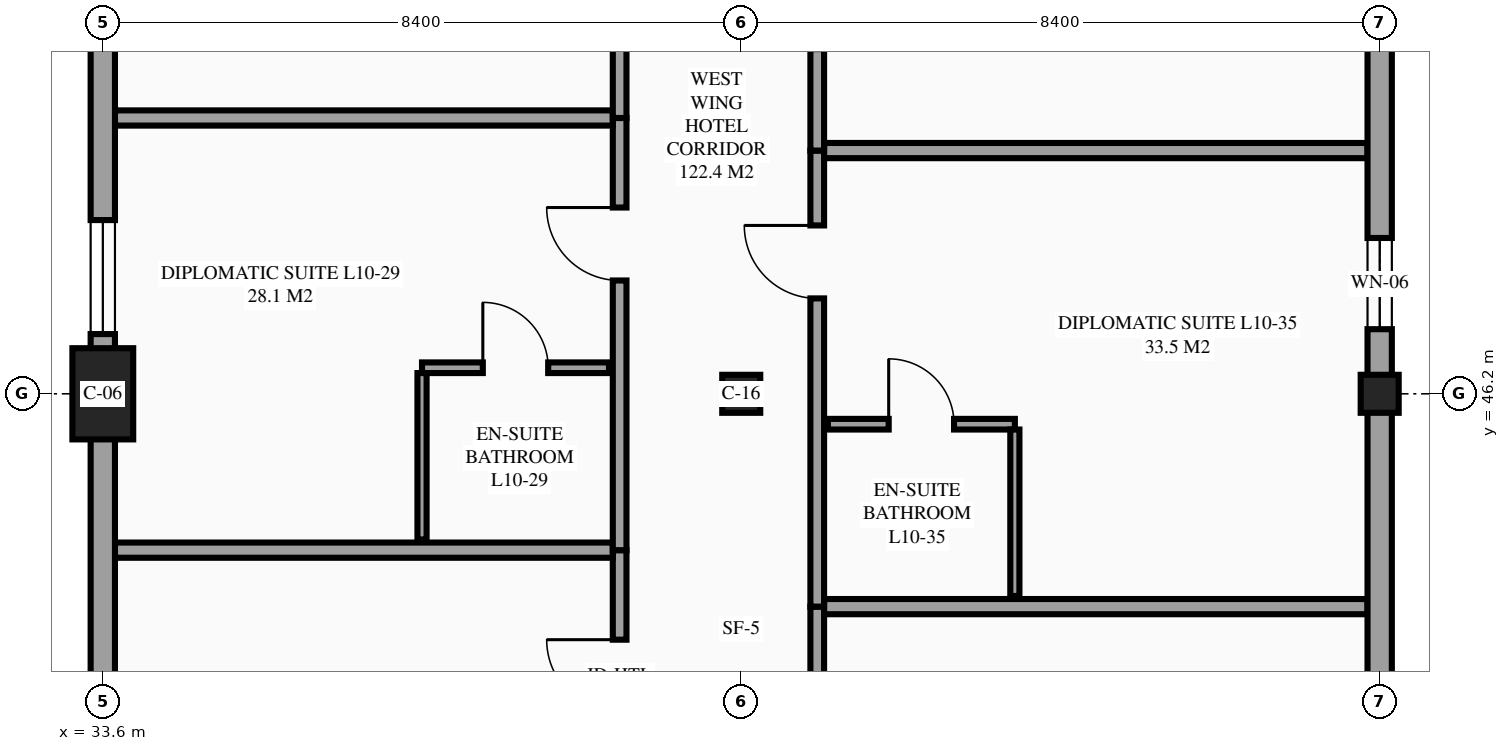
"""IFC4 building model, lengths in metres.
Left out: names, types, materials, properties, quantities, classifications, styles, units other than length and angle.
Written with IfcOpenShell. Run it as: python <this file> out.ifc"""

import sys

from ifc_helpers import new_model, si_unit, direction, frame, frame_2d, origin, origin_2d, place, context, subcontext, project, spatial, rectangle, extrude, element, fill, save


model = new_model("IFC4")
c1 = context("Model", 3, precision=1e-05, world=origin(), true_north=direction((0.0, 1.0)))
c2 = subcontext(c1, "Body", "Model", "MODEL_VIEW")
j1 = project(units=[si_unit("LENGTHUNIT", "METRE"), si_unit("PLANEANGLEUNIT", "RADIAN")], contexts=[c1])
p1 = place(None, origin())
s1 = spatial("IfcSite", under=j1, at=p1, CompositionType="ELEMENT")
p2 = place(p1, origin())
s2 = spatial("IfcBuilding", under=s1, at=p2, CompositionType="ELEMENT")
p3 = place(p2, frame((0.0, 0.0, 39.9)))
s3 = spatial("IfcBuildingStorey", under=s2, at=p3, CompositionType="ELEMENT", Elevation=39.9)
p4 = place(p3, frame((33.6, 46.2, 0.0), z_axis=(0.0, 0.0, 1.0), x_axis=(1.0, 0.0, 0.0)))
e1 = element("IfcColumn", 1, at=p4, inside=s3, PredefinedType="COLUMN", context=c2, shape_type="SweptSolid", body=[
    extrude(rectangle(XDim=0.8, YDim=1.2, at=origin_2d()), origin(), (0.0, 0.0, 1.0), 3.6),
])
for number, where, z_axis, x_axis in (
    (2, (42.0, 46.2, 0.0), (0.0, 0.0, 1.0), (1.0, 0.0, 0.0)),
    (3, (50.4, 46.2, 0.0), (0.0, 0.0, 1.0), (1.0, 0.0, 0.0)),
):
    element("IfcColumn", number, at=place(p3, frame(where, z_axis=z_axis, x_axis=x_axis)), inside=s3, PredefinedType="COLUMN", context=c2, shape_type="SweptSolid", body=[
        extrude(rectangle(XDim=0.5, YDim=0.5, at=origin_2d()), origin(), (0.0, 0.0, 1.0), 3.6),
    ])
p5 = place(p3, frame((40.4, 38.457, 0.0), z_axis=(0.0, 0.0, 1.0), x_axis=(0.0, 1.0, 0.0)))
e4 = element("IfcWall", 4, at=p5, inside=s3, PredefinedType="PARTITIONING", context=c2, shape_type="SweptSolid", body=[
    extrude(rectangle(XDim=5.686, YDim=0.18, at=frame_2d((2.843, 0.0))), origin(), (0.0, 0.0, 1.0), 3.375),
])
p6 = place(p5, frame((3.548, 0.0, 0.0)))
e5 = element("IfcOpeningElement", 5, at=p6, cuts=e4, PredefinedType="OPENING", context=c2, shape_type="SweptSolid", body=[
    extrude(rectangle(XDim=0.96, YDim=2.15, at=frame_2d((0.48, 1.075))), frame((0.0, 0.1, 0.0), z_axis=(0.0, -1.0, 0.0), x_axis=(1.0, 0.0, 0.0)), (0.0, 0.0, 1.0), 0.2),
])
p7 = place(p3, frame((33.76, 44.143, 0.0), z_axis=(0.0, 0.0, 1.0), x_axis=(1.0, 0.0, 0.0)))
e6 = element("IfcWall", 6, at=p7, inside=s3, PredefinedType="PARTITIONING", context=c2, shape_type="SweptSolid", body=[
    extrude(rectangle(XDim=6.55, YDim=0.2, at=frame_2d((3.275, 0.0))), origin(), (0.0, 0.0, 1.0), 3.375),
])
p8 = place(p3, frame((40.4, 44.143, 0.0), z_axis=(0.0, 0.0, 1.0), x_axis=(0.0, 1.0, 0.0)))
e7 = element("IfcWall", 7, at=p8, inside=s3, PredefinedType="PARTITIONING", context=c2, shape_type="SweptSolid", body=[
    extrude(rectangle(XDim=5.686, YDim=0.18, at=frame_2d((2.843, 0.0))), origin(), (0.0, 0.0, 1.0), 3.375),
])
p9 = place(p8, frame((3.548, 0.0, 0.0)))
e8 = element("IfcOpeningElement", 8, at=p9, cuts=e7, PredefinedType="OPENING", context=c2, shape_type="SweptSolid", body=[
    extrude(rectangle(XDim=0.96, YDim=2.15, at=frame_2d((0.48, 1.075))), frame((0.0, 0.1, 0.0), z_axis=(0.0, -1.0, 0.0), x_axis=(1.0, 0.0, 0.0)), (0.0, 0.0, 1.0), 0.2),
])
p10 = place(p3, frame((33.76, 49.829, 0.0), z_axis=(0.0, 0.0, 1.0), x_axis=(1.0, 0.0, 0.0)))
e9 = element("IfcWall", 9, at=p10, inside=s3, PredefinedType="PARTITIONING", context=c2, shape_type="SweptSolid", body=[
    extrude(rectangle(XDim=6.55, YDim=0.2, at=frame_2d((3.275, 0.0))), origin(), (0.0, 0.0, 1.0), 3.375),
])
p11 = place(p3, frame((37.8, 46.543, 0.0), z_axis=(0.0, 0.0, 1.0), x_axis=(1.0, 0.0, 0.0)))
e10 = element("IfcWall", 10, at=p11, inside=s3, PredefinedType="PARTITIONING", context=c2, shape_type="SweptSolid", body=[
    extrude(rectangle(XDim=2.46, YDim=0.14, at=frame_2d((1.23, 0.0))), origin(), (0.0, 0.0, 1.0), 3.375),
])
p12 = place(p11, frame((0.8, 0.0, 0.0)))
e11 = element("IfcOpeningElement", 11, at=p12, cuts=e10, PredefinedType="OPENING", context=c2, shape_type="SweptSolid", body=[
    extrude(rectangle(XDim=0.86, YDim=2.1, at=frame_2d((0.43, 1.05))), frame((0.0, 0.08, 0.0), z_axis=(0.0, -1.0, 0.0), x_axis=(1.0, 0.0, 0.0)), (0.0, 0.0, 1.0), 0.16),
])
p13 = place(p3, frame((37.8, 44.283, 0.0), z_axis=(0.0, 0.0, 1.0), x_axis=(0.0, 1.0, 0.0)))
e12 = element("IfcWall", 12, at=p13, inside=s3, PredefinedType="PARTITIONING", context=c2, shape_type="SweptSolid", body=[
    extrude(rectangle(XDim=2.19, YDim=0.12, at=frame_2d((1.095, 0.0))), origin(), (0.0, 0.0, 1.0), 3.375),
])
p14 = place(p3, frame((40.4, 49.829, 0.0), z_axis=(0.0, 0.0, 1.0), x_axis=(0.0, 1.0, 0.0)))
e13 = element("IfcWall", 13, at=p14, inside=s3, PredefinedType="PARTITIONING", context=c2, shape_type="SweptSolid", body=[
    extrude(rectangle(XDim=5.686, YDim=0.18, at=frame_2d((2.843, 0.0))), origin(), (0.0, 0.0, 1.0), 3.375),
])
p15 = place(p14, frame((1.178, 0.0, 0.0)))
e14 = element("IfcOpeningElement", 14, at=p15, cuts=e13, PredefinedType="OPENING", context=c2, shape_type="SweptSolid", body=[
    extrude(rectangle(XDim=0.96, YDim=2.15, at=frame_2d((0.48, 1.075))), frame((0.0, 0.1, 0.0), z_axis=(0.0, -1.0, 0.0), x_axis=(1.0, 0.0, 0.0)), (0.0, 0.0, 1.0), 0.2),
])
p16 = place(p3, frame((43.0, 37.4, 0.0), z_axis=(0.0, 0.0, 1.0), x_axis=(0.0, 1.0, 0.0)))
e15 = element("IfcWall", 15, at=p16, inside=s3, PredefinedType="PARTITIONING", context=c2, shape_type="SweptSolid", body=[
    extrude(rectangle(XDim=6.0, YDim=0.18, at=frame_2d((3.0, 0.0))), origin(), (0.0, 0.0, 1.0), 3.375),
])
p17 = place(p16, frame((3.705, 0.0, 0.0)))
e16 = element("IfcOpeningElement", 16, at=p17, cuts=e15, PredefinedType="OPENING", context=c2, shape_type="SweptSolid", body=[
    extrude(rectangle(XDim=0.96, YDim=2.15, at=frame_2d((0.48, 1.075))), frame((0.0, 0.1, 0.0), z_axis=(0.0, -1.0, 0.0), x_axis=(1.0, 0.0, 0.0)), (0.0, 0.0, 1.0), 0.2),
])
p18 = place(p3, frame((43.09, 43.4, 0.0), z_axis=(0.0, 0.0, 1.0), x_axis=(1.0, 0.0, 0.0)))
e17 = element("IfcWall", 17, at=p18, inside=s3, PredefinedType="PARTITIONING", context=c2, shape_type="SweptSolid", body=[
    extrude(rectangle(XDim=7.15, YDim=0.2, at=frame_2d((3.575, 0.0))), origin(), (0.0, 0.0, 1.0), 3.375),
])
p19 = place(p3, frame((43.0, 43.4, 0.0), z_axis=(0.0, 0.0, 1.0), x_axis=(0.0, 1.0, 0.0)))
e18 = element("IfcWall", 18, at=p19, inside=s3, PredefinedType="PARTITIONING", context=c2, shape_type="SweptSolid", body=[
    extrude(rectangle(XDim=6.0, YDim=0.18, at=frame_2d((3.0, 0.0))), origin(), (0.0, 0.0, 1.0), 3.375),
])
p20 = place(p19, frame((4.055, 0.0, 0.0)))
e19 = element("IfcOpeningElement", 19, at=p20, cuts=e18, PredefinedType="OPENING", context=c2, shape_type="SweptSolid", body=[
    extrude(rectangle(XDim=0.96, YDim=2.15, at=frame_2d((0.48, 1.075))), frame((0.0, 0.1, 0.0), z_axis=(0.0, -1.0, 0.0), x_axis=(1.0, 0.0, 0.0)), (0.0, 0.0, 1.0), 0.2),
])
p21 = place(p3, frame((43.09, 49.4, 0.0), z_axis=(0.0, 0.0, 1.0), x_axis=(1.0, 0.0, 0.0)))
e20 = element("IfcWall", 20, at=p21, inside=s3, PredefinedType="PARTITIONING", context=c2, shape_type="SweptSolid", body=[
    extrude(rectangle(XDim=7.15, YDim=0.2, at=frame_2d((3.575, 0.0))), origin(), (0.0, 0.0, 1.0), 3.375),
])
p22 = place(p3, frame((43.14, 45.8, 0.0), z_axis=(0.0, 0.0, 1.0), x_axis=(1.0, 0.0, 0.0)))
e21 = element("IfcWall", 21, at=p22, inside=s3, PredefinedType="PARTITIONING", context=c2, shape_type="SweptSolid", body=[
    extrude(rectangle(XDim=2.46, YDim=0.14, at=frame_2d((1.23, 0.0))), origin(), (0.0, 0.0, 1.0), 3.375),
])
p23 = place(p22, frame((0.8, 0.0, 0.0)))
e22 = element("IfcOpeningElement", 22, at=p23, cuts=e21, PredefinedType="OPENING", context=c2, shape_type="SweptSolid", body=[
    extrude(rectangle(XDim=0.86, YDim=2.1, at=frame_2d((0.43, 1.05))), frame((0.0, 0.08, 0.0), z_axis=(0.0, -1.0, 0.0), x_axis=(1.0, 0.0, 0.0)), (0.0, 0.0, 1.0), 0.16),
])
p24 = place(p3, frame((45.6, 43.54, 0.0), z_axis=(0.0, 0.0, 1.0), x_axis=(0.0, 1.0, 0.0)))
e23 = element("IfcWall", 23, at=p24, inside=s3, PredefinedType="PARTITIONING", context=c2, shape_type="SweptSolid", body=[
    extrude(rectangle(XDim=2.19, YDim=0.12, at=frame_2d((1.095, 0.0))), origin(), (0.0, 0.0, 1.0), 3.375),
])
p25 = place(p3, frame((43.0, 49.4, 0.0), z_axis=(0.0, 0.0, 1.0), x_axis=(0.0, 1.0, 0.0)))
e24 = element("IfcWall", 24, at=p25, inside=s3, PredefinedType="PARTITIONING", context=c2, shape_type="SweptSolid", body=[
    extrude(rectangle(XDim=6.0, YDim=0.18, at=frame_2d((3.0, 0.0))), origin(), (0.0, 0.0, 1.0), 3.375),
])
p26 = place(p25, frame((1.335, 0.0, 0.0)))
e25 = element("IfcOpeningElement", 25, at=p26, cuts=e24, PredefinedType="OPENING", context=c2, shape_type="SweptSolid", body=[
    extrude(rectangle(XDim=0.96, YDim=2.15, at=frame_2d((0.48, 1.075))), frame((0.0, 0.1, 0.0), z_axis=(0.0, -1.0, 0.0), x_axis=(1.0, 0.0, 0.0)), (0.0, 0.0, 1.0), 0.2),
])
p27 = place(p3, frame((50.4, 37.8, 0.0), z_axis=(0.0, 0.0, 1.0), x_axis=(0.0, 1.0, 0.0)))
e26 = element("IfcWall", 26, at=p27, inside=s3, PredefinedType="STANDARD", context=c2, shape_type="SweptSolid", body=[
    extrude(rectangle(XDim=8.4, YDim=0.32, at=frame_2d((4.2, 0.0))), origin(), (0.0, 0.0, 1.0), 2.58),
])
p28 = place(p27, frame((1.85, 0.0, 0.85)))
e27 = element("IfcOpeningElement", 27, at=p28, cuts=e26, PredefinedType="OPENING", context=c2, shape_type="SweptSolid", body=[
    extrude(rectangle(XDim=1.5, YDim=1.5, at=frame_2d((0.75, 0.75))), frame((0.0, 0.17, 0.0), z_axis=(0.0, -1.0, 0.0), x_axis=(1.0, 0.0, 0.0)), (0.0, 0.0, 1.0), 0.34),
])
p29 = place(p3, frame((50.4, 46.2, 0.0), z_axis=(0.0, 0.0, 1.0), x_axis=(0.0, 1.0, 0.0)))
e28 = element("IfcWall", 28, at=p29, inside=s3, PredefinedType="STANDARD", context=c2, shape_type="SweptSolid", body=[
    extrude(rectangle(XDim=8.4, YDim=0.32, at=frame_2d((4.2, 0.0))), origin(), (0.0, 0.0, 1.0), 3.126),
])
p30 = place(p29, frame((0.85, 0.0, 0.85)))
e29 = element("IfcOpeningElement", 29, at=p30, cuts=e28, PredefinedType="OPENING", context=c2, shape_type="SweptSolid", body=[
    extrude(rectangle(XDim=1.2, YDim=1.5, at=frame_2d((0.6, 0.75))), frame((0.0, 0.17, 0.0), z_axis=(0.0, -1.0, 0.0), x_axis=(1.0, 0.0, 0.0)), (0.0, 0.0, 1.0), 0.34),
])
p31 = place(p29, frame((5.45, 0.0, 0.85)))
e30 = element("IfcOpeningElement", 30, at=p31, cuts=e28, PredefinedType="OPENING", context=c2, shape_type="SweptSolid", body=[
    extrude(rectangle(XDim=1.5, YDim=1.5, at=frame_2d((0.75, 0.75))), frame((0.0, 0.17, 0.0), z_axis=(0.0, -1.0, 0.0), x_axis=(1.0, 0.0, 0.0)), (0.0, 0.0, 1.0), 0.34),
])
p32 = place(p3, frame((33.6, 54.6, 0.0), z_axis=(0.0, 0.0, 1.0), x_axis=(0.0, -1.0, 0.0)))
e31 = element("IfcWall", 31, at=p32, inside=s3, PredefinedType="STANDARD", context=c2, shape_type="SweptSolid", body=[
    extrude(rectangle(XDim=8.4, YDim=0.32, at=frame_2d((4.2, 0.0))), origin(), (0.0, 0.0, 1.0), 2.43),
])
p33 = place(p32, frame((6.114, 0.0, 0.85)))
e32 = element("IfcOpeningElement", 32, at=p33, cuts=e31, PredefinedType="OPENING", context=c2, shape_type="SweptSolid", body=[
    extrude(rectangle(XDim=1.5, YDim=1.5, at=frame_2d((0.75, 0.75))), frame((0.0, 0.17, 0.0), z_axis=(0.0, -1.0, 0.0), x_axis=(1.0, 0.0, 0.0)), (0.0, 0.0, 1.0), 0.34),
])
p34 = place(p32, frame((1.178, 0.0, 0.85)))
e33 = element("IfcOpeningElement", 33, at=p34, cuts=e31, PredefinedType="OPENING", context=c2, shape_type="SweptSolid", body=[
    extrude(rectangle(XDim=1.5, YDim=1.5, at=frame_2d((0.75, 0.75))), frame((0.0, 0.17, 0.0), z_axis=(0.0, -1.0, 0.0), x_axis=(1.0, 0.0, 0.0)), (0.0, 0.0, 1.0), 0.34),
])
p35 = place(p3, frame((33.6, 46.2, 0.0), z_axis=(0.0, 0.0, 1.0), x_axis=(0.0, -1.0, 0.0)))
e34 = element("IfcWall", 34, at=p35, inside=s3, PredefinedType="STANDARD", context=c2, shape_type="SweptSolid", body=[
    extrude(rectangle(XDim=8.4, YDim=0.32, at=frame_2d((4.2, 0.0))), origin(), (0.0, 0.0, 1.0), 2.78),
])
p36 = place(p35, frame((4.15, 0.0, 0.85)))
e35 = element("IfcOpeningElement", 35, at=p36, cuts=e34, PredefinedType="OPENING", context=c2, shape_type="SweptSolid", body=[
    extrude(rectangle(XDim=1.5, YDim=1.5, at=frame_2d((0.75, 0.75))), frame((0.0, 0.17, 0.0), z_axis=(0.0, -1.0, 0.0), x_axis=(1.0, 0.0, 0.0)), (0.0, 0.0, 1.0), 0.34),
])
p37 = place(p33, origin())
e36 = element("IfcWindow", 36, at=p37, inside=s3, PartitioningType="SINGLE_PANEL", PredefinedType="WINDOW", context=c2, shape_type="SweptSolid", body=[
    extrude(rectangle(XDim=1.5, YDim=1.5, at=frame_2d((0.75, 0.75))), frame((0.0, 0.03, 0.0), z_axis=(0.0, -1.0, 0.0), x_axis=(1.0, 0.0, 0.0)), (0.0, 0.0, 1.0), 0.06),
])
fill(e32, e36)
p38 = place(p30, origin())
e37 = element("IfcWindow", 37, at=p38, inside=s3, PartitioningType="SINGLE_PANEL", PredefinedType="WINDOW", context=c2, shape_type="SweptSolid", body=[
    extrude(rectangle(XDim=1.2, YDim=1.5, at=frame_2d((0.6, 0.75))), frame((0.0, 0.03, 0.0), z_axis=(0.0, -1.0, 0.0), x_axis=(1.0, 0.0, 0.0)), (0.0, 0.0, 1.0), 0.06),
])
fill(e29, e37)
p39 = place(p6, origin())
e38 = element("IfcDoor", 38, at=p39, inside=s3, OperationType="SINGLE_SWING_RIGHT", PredefinedType="DOOR", context=c2, shape_type="SweptSolid", body=[
    extrude(rectangle(XDim=0.96, YDim=2.15, at=frame_2d((0.48, 1.075))), frame((0.0, 0.025, 0.0), z_axis=(0.0, -1.0, 0.0), x_axis=(1.0, 0.0, 0.0)), (0.0, 0.0, 1.0), 0.05),
])
fill(e5, e38)
p40 = place(p9, origin())
e39 = element("IfcDoor", 39, at=p40, inside=s3, OperationType="SINGLE_SWING_RIGHT", PredefinedType="DOOR", context=c2, shape_type="SweptSolid", body=[
    extrude(rectangle(XDim=0.96, YDim=2.15, at=frame_2d((0.48, 1.075))), frame((0.0, 0.025, 0.0), z_axis=(0.0, -1.0, 0.0), x_axis=(1.0, 0.0, 0.0)), (0.0, 0.0, 1.0), 0.05),
])
fill(e8, e39)
p41 = place(p12, origin())
e40 = element("IfcDoor", 40, at=p41, inside=s3, OperationType="SINGLE_SWING_LEFT", PredefinedType="DOOR", context=c2, shape_type="SweptSolid", body=[
    extrude(rectangle(XDim=0.86, YDim=2.1, at=frame_2d((0.43, 1.05))), frame((0.0, 0.025, 0.0), z_axis=(0.0, -1.0, 0.0), x_axis=(1.0, 0.0, 0.0)), (0.0, 0.0, 1.0), 0.05),
])
fill(e11, e40)
p42 = place(p20, origin())
e41 = element("IfcDoor", 41, at=p42, inside=s3, OperationType="SINGLE_SWING_RIGHT", PredefinedType="DOOR", context=c2, shape_type="SweptSolid", body=[
    extrude(rectangle(XDim=0.96, YDim=2.15, at=frame_2d((0.48, 1.075))), frame((0.0, 0.025, 0.0), z_axis=(0.0, -1.0, 0.0), x_axis=(1.0, 0.0, 0.0)), (0.0, 0.0, 1.0), 0.05),
])
fill(e19, e41)
p43 = place(p23, origin())
e42 = element("IfcDoor", 42, at=p43, inside=s3, OperationType="SINGLE_SWING_LEFT", PredefinedType="DOOR", context=c2, shape_type="SweptSolid", body=[
    extrude(rectangle(XDim=0.86, YDim=2.1, at=frame_2d((0.43, 1.05))), frame((0.0, 0.025, 0.0), z_axis=(0.0, -1.0, 0.0), x_axis=(1.0, 0.0, 0.0)), (0.0, 0.0, 1.0), 0.05),
])
fill(e22, e42)
save(model, sys.argv[1])
